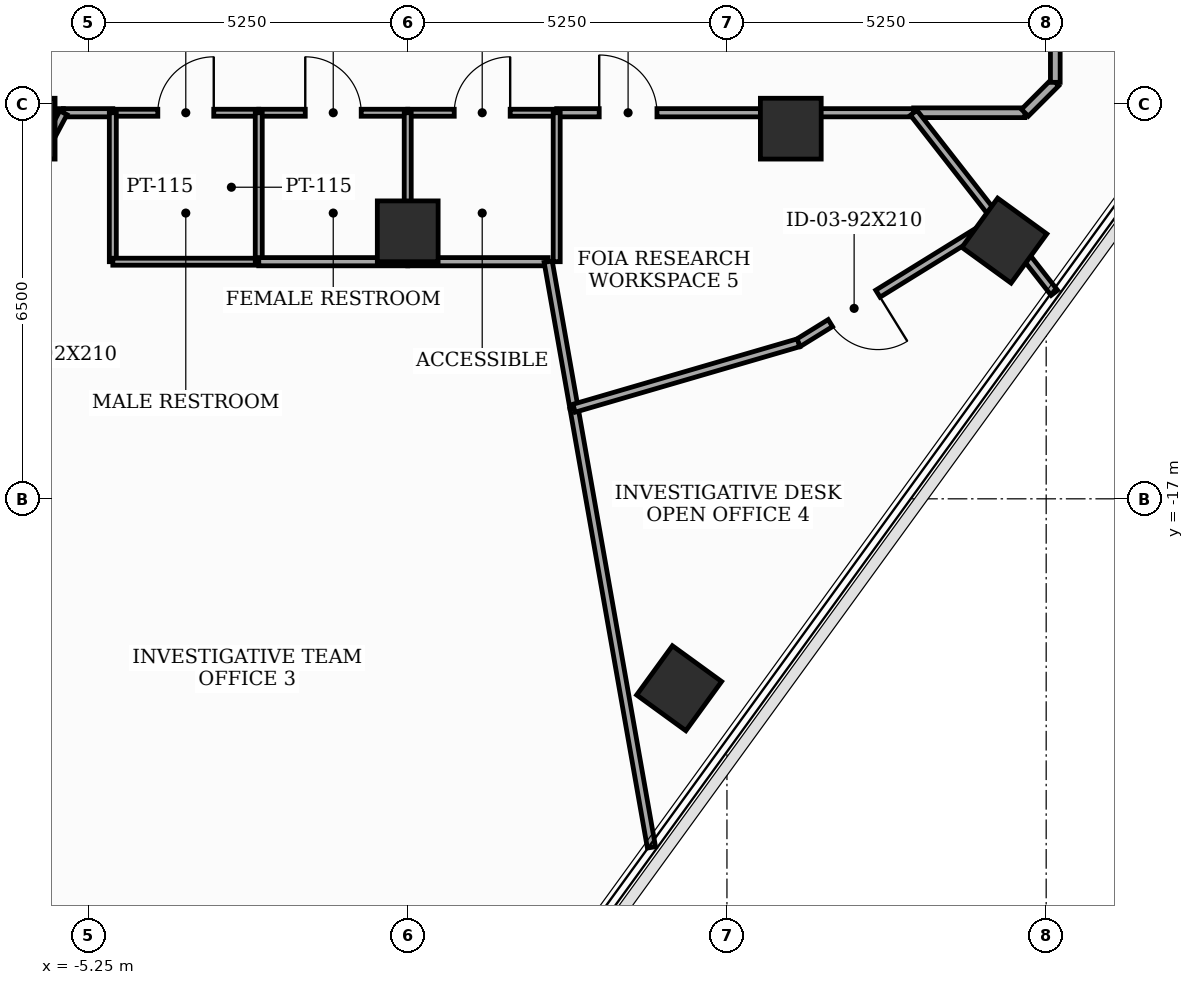
"""IFC4 building model, lengths in metres.
Left out: names, types, materials, properties, quantities, classifications, styles, units other than length and angle.
Written with IfcOpenShell. Run it as: python <this file> out.ifc"""

import sys

from ifc_helpers import new_model, si_unit, direction, frame, frame_2d, origin, origin_2d, place, context, subcontext, project, spatial, rectangle, extrude, element, fill, save


model = new_model("IFC4")
c1 = context("Model", 3, precision=1e-05, world=origin(), true_north=direction((0.0, 1.0)))
c2 = subcontext(c1, "Body", "Model", "MODEL_VIEW")
j1 = project(units=[si_unit("LENGTHUNIT", "METRE"), si_unit("PLANEANGLEUNIT", "RADIAN")], contexts=[c1])
p1 = place(None, origin())
s1 = spatial("IfcSite", under=j1, at=p1, CompositionType="ELEMENT")
p2 = place(p1, origin())
s2 = spatial("IfcBuilding", under=s1, at=p2, CompositionType="ELEMENT")
p3 = place(p2, frame((0.0, 0.0, 237.4)))
s3 = spatial("IfcBuildingStorey", under=s2, at=p3, CompositionType="ELEMENT", Elevation=237.4)
for number, where, z_axis, x_axis in (
    (1, (-6.3, -10.912, 0.0), (0.0, 0.0, 1.0), (1.0, 0.0, 0.0)),
    (2, (0.0, -12.6, 0.0), (0.0, 0.0, 1.0), (1.0, 0.0, 0.0)),
    (3, (6.3, -10.912, 0.0), (0.0, 0.0, 1.0), (1.0, 0.0, 0.0)),
    (4, (4.464, -20.115, 0.0), (0.0, 0.0, 1.0), (0.588, 0.809, 0.0)),
    (5, (9.812, -12.753, 0.0), (0.0, 0.0, 1.0), (0.588, 0.809, 0.0)),
):
    element("IfcColumn", number, at=place(p3, frame(where, z_axis=z_axis, x_axis=x_axis)), inside=s3, PredefinedType="COLUMN", context=c2, shape_type="SweptSolid", body=[
        extrude(rectangle(XDim=1.0, YDim=1.0, at=origin_2d()), origin(), (0.0, 0.0, 1.0), 3.7),
    ])
p4 = place(p3, frame((-10.15, -10.65, 0.0), z_axis=(0.0, 0.0, 1.0), x_axis=(1.0, 0.0, 0.0)))
e6 = element("IfcWall", 6, at=p4, inside=s3, PredefinedType="PARTITIONING", context=c2, shape_type="SweptSolid", body=[
    extrude(rectangle(XDim=4.487, YDim=0.135, at=frame_2d((2.243, 0.0))), origin(), (0.0, 0.0, 1.0), 2.885),
])
p5 = place(p4, frame((0.781, 0.0, 0.0)))
e7 = element("IfcOpeningElement", 7, at=p5, cuts=e6, PredefinedType="OPENING", context=c2, shape_type="SweptSolid", body=[
    extrude(rectangle(XDim=0.95, YDim=2.1, at=frame_2d((0.475, 1.05))), frame((0.0, 0.077, 0.0), z_axis=(0.0, -1.0, 0.0), x_axis=(1.0, 0.0, 0.0)), (0.0, 0.0, 1.0), 0.155),
])
p6 = place(p3, frame((-4.85, -10.65, 0.0), z_axis=(0.0, 0.0, 1.0), x_axis=(1.0, 0.0, 0.0)))
e8 = element("IfcWall", 8, at=p6, inside=s3, PredefinedType="PARTITIONING", context=c2, shape_type="SweptSolid", body=[
    extrude(rectangle(XDim=2.4, YDim=0.115, at=frame_2d((1.2, 0.0))), origin(), (0.0, 0.0, 1.0), 3.5),
])
p7 = place(p6, frame((0.74, 0.0, 0.0)))
e9 = element("IfcOpeningElement", 9, at=p7, cuts=e8, PredefinedType="OPENING", context=c2, shape_type="SweptSolid", body=[
    extrude(rectangle(XDim=0.92, YDim=2.1, at=frame_2d((0.46, 1.05))), frame((0.0, 0.067, 0.0), z_axis=(0.0, -1.0, 0.0), x_axis=(1.0, 0.0, 0.0)), (0.0, 0.0, 1.0), 0.135),
])
p8 = place(p3, frame((-5.663, -10.65, 0.0), z_axis=(0.0, 0.0, 1.0), x_axis=(1.0, 0.0, 0.0)))
e10 = element("IfcWall", 10, at=p8, inside=s3, PredefinedType="PARTITIONING", context=c2, shape_type="SweptSolid", body=[
    extrude(rectangle(XDim=0.813, YDim=0.135, at=frame_2d((0.406, 0.0))), origin(), (0.0, 0.0, 1.0), 3.5),
])
p9 = place(p3, frame((-2.45, -10.65, 0.0), z_axis=(0.0, 0.0, 1.0), x_axis=(1.0, 0.0, 0.0)))
e11 = element("IfcWall", 11, at=p9, inside=s3, PredefinedType="PARTITIONING", context=c2, shape_type="SweptSolid", body=[
    extrude(rectangle(XDim=2.45, YDim=0.115, at=frame_2d((1.225, 0.0))), origin(), (0.0, 0.0, 1.0), 2.885),
])
p10 = place(p9, frame((0.765, 0.0, 0.0)))
e12 = element("IfcOpeningElement", 12, at=p10, cuts=e11, PredefinedType="OPENING", context=c2, shape_type="SweptSolid", body=[
    extrude(rectangle(XDim=0.92, YDim=2.1, at=frame_2d((0.46, 1.05))), frame((0.0, 0.067, 0.0), z_axis=(0.0, -1.0, 0.0), x_axis=(1.0, 0.0, 0.0)), (0.0, 0.0, 1.0), 0.135),
])
p11 = place(p3, frame((0.0, -10.65, 0.0), z_axis=(0.0, 0.0, 1.0), x_axis=(1.0, 0.0, 0.0)))
e13 = element("IfcWall", 13, at=p11, inside=s3, PredefinedType="PARTITIONING", context=c2, shape_type="SweptSolid", body=[
    extrude(rectangle(XDim=2.45, YDim=0.115, at=frame_2d((1.225, 0.0))), origin(), (0.0, 0.0, 1.0), 3.5),
])
p12 = place(p11, frame((0.765, 0.0, 0.0)))
e14 = element("IfcOpeningElement", 14, at=p12, cuts=e13, PredefinedType="OPENING", context=c2, shape_type="SweptSolid", body=[
    extrude(rectangle(XDim=0.92, YDim=2.1, at=frame_2d((0.46, 1.05))), frame((0.0, 0.067, 0.0), z_axis=(0.0, -1.0, 0.0), x_axis=(1.0, 0.0, 0.0)), (0.0, 0.0, 1.0), 0.135),
])
p13 = place(p3, frame((2.45, -10.65, 0.0), z_axis=(0.0, 0.0, 1.0), x_axis=(1.0, 0.0, 0.0)))
e15 = element("IfcWall", 15, at=p13, inside=s3, PredefinedType="PARTITIONING", context=c2, shape_type="SweptSolid", body=[
    extrude(rectangle(XDim=5.871, YDim=0.135, at=frame_2d((2.936, 0.0))), origin(), (0.0, 0.0, 1.0), 2.885),
])
p14 = place(p13, frame((0.699, 0.0, 0.0)))
e16 = element("IfcOpeningElement", 16, at=p14, cuts=e15, PredefinedType="OPENING", context=c2, shape_type="SweptSolid", body=[
    extrude(rectangle(XDim=0.95, YDim=2.1, at=frame_2d((0.475, 1.05))), frame((0.0, 0.077, 0.0), z_axis=(0.0, -1.0, 0.0), x_axis=(1.0, 0.0, 0.0)), (0.0, 0.0, 1.0), 0.155),
])
p15 = place(p3, frame((8.321, -10.65, 0.0), z_axis=(0.0, 0.0, 1.0), x_axis=(1.0, 0.0, 0.0)))
e17 = element("IfcWall", 17, at=p15, inside=s3, PredefinedType="PARTITIONING", context=c2, shape_type="SweptSolid", body=[
    extrude(rectangle(XDim=1.829, YDim=0.16, at=frame_2d((0.915, 0.0))), origin(), (0.0, 0.0, 1.0), 3.5),
])
p16 = place(p3, frame((10.15, -10.65, 0.0), z_axis=(0.0, 0.0, 1.0), x_axis=(0.707106781187, 0.707106781187, 0.0)))
e18 = element("IfcWall", 18, at=p16, inside=s3, PredefinedType="PARTITIONING", context=c2, shape_type="SweptSolid", body=[
    extrude(rectangle(XDim=0.707, YDim=0.16, at=frame_2d((0.354, 0.0))), origin(), (0.0, 0.0, 1.0), 3.5),
])
p17 = place(p3, frame((10.65, -10.15, 0.0), z_axis=(0.0, 0.0, 1.0), x_axis=(0.0, 1.0, 0.0)))
e19 = element("IfcWall", 19, at=p17, inside=s3, PredefinedType="PARTITIONING", context=c2, shape_type="SweptSolid", body=[
    extrude(rectangle(XDim=5.408, YDim=0.16, at=frame_2d((2.704, 0.0))), origin(), (0.0, 0.0, 1.0), 2.885),
])
p18 = place(p17, frame((0.582, 0.0, 0.0)))
e20 = element("IfcOpeningElement", 20, at=p18, cuts=e19, PredefinedType="OPENING", context=c2, shape_type="SweptSolid", body=[
    extrude(rectangle(XDim=1.0, YDim=2.15, at=frame_2d((0.5, 1.075))), frame((0.0, 0.09, 0.0), z_axis=(0.0, -1.0, 0.0), x_axis=(1.0, 0.0, 0.0)), (0.0, 0.0, 1.0), 0.18),
])
p19 = place(p3, frame((-9.893, -18.605, 0.0), z_axis=(0.0, 0.0, 1.0), x_axis=(0.469478145305, 0.88294409284, 0.0)))
e21 = element("IfcWall", 21, at=p19, inside=s3, PredefinedType="PARTITIONING", context=c2, shape_type="SweptSolid", body=[
    extrude(rectangle(XDim=9.01, YDim=0.135, at=frame_2d((4.505, 0.0))), origin(), (0.0, 0.0, 1.0), 2.885),
])
p20 = place(p19, frame((4.045, 0.0, 0.0)))
e22 = element("IfcOpeningElement", 22, at=p20, cuts=e21, PredefinedType="OPENING", context=c2, shape_type="SweptSolid", body=[
    extrude(rectangle(XDim=0.92, YDim=2.1, at=frame_2d((0.46, 1.05))), frame((0.0, 0.077, 0.0), z_axis=(0.0, -1.0, 0.0), x_axis=(1.0, 0.0, 0.0)), (0.0, 0.0, 1.0), 0.155),
])
p21 = place(p3, frame((-4.85, -10.65, 0.0), z_axis=(0.0, 0.0, 1.0), x_axis=(0.0, -1.0, 0.0)))
e23 = element("IfcWall", 23, at=p21, inside=s3, PredefinedType="PARTITIONING", context=c2, shape_type="SweptSolid", body=[
    extrude(rectangle(XDim=2.45, YDim=0.115, at=frame_2d((1.225, 0.0))), origin(), (0.0, 0.0, 1.0), 2.885),
])
p22 = place(p3, frame((-4.85, -13.1, 0.0), z_axis=(0.0, 0.0, 1.0), x_axis=(1.0, 0.0, 0.0)))
e24 = element("IfcWall", 24, at=p22, inside=s3, PredefinedType="PARTITIONING", context=c2, shape_type="SweptSolid", body=[
    extrude(rectangle(XDim=2.4, YDim=0.115, at=frame_2d((1.2, 0.0))), origin(), (0.0, 0.0, 1.0), 3.5),
])
p23 = place(p3, frame((-2.45, -13.1, 0.0), z_axis=(0.0, 0.0, 1.0), x_axis=(0.0, 1.0, 0.0)))
e25 = element("IfcWall", 25, at=p23, inside=s3, PredefinedType="PARTITIONING", context=c2, shape_type="SweptSolid", body=[
    extrude(rectangle(XDim=2.45, YDim=0.115, at=frame_2d((1.225, 0.0))), origin(), (0.0, 0.0, 1.0), 2.885),
])
p24 = place(p3, frame((0.0, -13.1, 0.0), z_axis=(0.0, 0.0, 1.0), x_axis=(-1.0, 0.0, 0.0)))
e26 = element("IfcWall", 26, at=p24, inside=s3, PredefinedType="PARTITIONING", context=c2, shape_type="SweptSolid", body=[
    extrude(rectangle(XDim=2.45, YDim=0.135, at=frame_2d((1.225, 0.0))), origin(), (0.0, 0.0, 1.0), 3.5),
])
p25 = place(p3, frame((2.31, -13.1, 0.0), z_axis=(0.0, 0.0, 1.0), x_axis=(-1.0, 0.0, 0.0)))
e27 = element("IfcWall", 27, at=p25, inside=s3, PredefinedType="PARTITIONING", context=c2, shape_type="SweptSolid", body=[
    extrude(rectangle(XDim=2.31, YDim=0.135, at=frame_2d((1.155, 0.0))), origin(), (0.0, 0.0, 1.0), 2.985),
])
p26 = place(p3, frame((4.009, -22.732, 0.0), z_axis=(0.0, 0.0, 1.0), x_axis=(-0.173639103053, 0.984809353068, 0.0)))
e28 = element("IfcWall", 28, at=p26, inside=s3, PredefinedType="PARTITIONING", context=c2, shape_type="SweptSolid", body=[
    extrude(rectangle(XDim=7.334, YDim=0.135, at=frame_2d((3.667, 0.0))), origin(), (0.0, 0.0, 1.0), 2.985),
])
p27 = place(p3, frame((2.735, -15.51, 0.0), z_axis=(0.0, 0.0, 1.0), x_axis=(-0.173694270709, 0.984799624453, 0.0)))
e29 = element("IfcWall", 29, at=p27, inside=s3, PredefinedType="PARTITIONING", context=c2, shape_type="SweptSolid", body=[
    extrude(rectangle(XDim=2.447, YDim=0.135, at=frame_2d((1.224, 0.0))), origin(), (0.0, 0.0, 1.0), 3.5),
])
for number, where, z_axis, x_axis in (
    (30, (0.0, -13.1, 0.0), (0.0, 0.0, 1.0), (0.0, 1.0, 0.0)),
    (31, (2.45, -13.1, 0.0), (0.0, 0.0, 1.0), (0.0, 1.0, 0.0)),
):
    element("IfcWall", number, at=place(p3, frame(where, z_axis=z_axis, x_axis=x_axis)), inside=s3, PredefinedType="PARTITIONING", context=c2, shape_type="SweptSolid", body=[
        extrude(rectangle(XDim=2.45, YDim=0.115, at=frame_2d((1.225, 0.0))), origin(), (0.0, 0.0, 1.0), 2.885),
    ])
p28 = place(p3, frame((9.696, -12.411, 0.0), z_axis=(0.0, 0.0, 1.0), x_axis=(-0.850393663863, -0.526146953295, 0.0)))
e32 = element("IfcWall", 32, at=p28, inside=s3, PredefinedType="PARTITIONING", context=c2, shape_type="SweptSolid", body=[
    extrude(rectangle(XDim=3.845, YDim=0.135, at=frame_2d((1.923, 0.0))), origin(), (0.0, 0.0, 1.0), 2.985),
])
p29 = place(p28, frame((2.309, 0.0, 0.0)))
e33 = element("IfcOpeningElement", 33, at=p29, cuts=e32, PredefinedType="OPENING", context=c2, shape_type="SweptSolid", body=[
    extrude(rectangle(XDim=0.92, YDim=2.1, at=frame_2d((0.46, 1.05))), frame((0.0, 0.077, 0.0), z_axis=(0.0, -1.0, 0.0), x_axis=(1.0, 0.0, 0.0)), (0.0, 0.0, 1.0), 0.155),
])
p30 = place(p3, frame((6.426, -14.434, 0.0), z_axis=(0.0, 0.0, 1.0), x_axis=(-0.960041241254, -0.279858562654, 0.0)))
e34 = element("IfcWall", 34, at=p30, inside=s3, PredefinedType="PARTITIONING", context=c2, shape_type="SweptSolid", body=[
    extrude(rectangle(XDim=3.844, YDim=0.135, at=frame_2d((1.922, 0.0))), origin(), (0.0, 0.0, 1.0), 3.5),
])
p31 = place(p3, frame((10.635, -13.612, 0.0), z_axis=(0.0, 0.0, 1.0), x_axis=(-0.615768345532, 0.787927245779, 0.0)))
e35 = element("IfcWall", 35, at=p31, inside=s3, PredefinedType="PARTITIONING", context=c2, shape_type="SweptSolid", body=[
    extrude(rectangle(XDim=1.524, YDim=0.135, at=frame_2d((0.762, 0.0))), origin(), (0.0, 0.0, 1.0), 2.985),
])
p32 = place(p3, frame((9.696, -12.411, 0.0), z_axis=(0.0, 0.0, 1.0), x_axis=(-0.615429845305, 0.788191668002, 0.0)))
e36 = element("IfcWall", 36, at=p32, inside=s3, PredefinedType="PARTITIONING", context=c2, shape_type="SweptSolid", body=[
    extrude(rectangle(XDim=2.234, YDim=0.135, at=frame_2d((1.117, 0.0))), origin(), (0.0, 0.0, 1.0), 2.985),
])
p33 = place(p7, origin())
e37 = element("IfcDoor", 37, at=p33, inside=s3, OperationType="SINGLE_SWING_RIGHT", PredefinedType="DOOR", context=c2, shape_type="SweptSolid", body=[
    extrude(rectangle(XDim=0.92, YDim=2.1, at=frame_2d((0.46, 1.05))), frame((0.0, 0.025, 0.0), z_axis=(0.0, -1.0, 0.0), x_axis=(1.0, 0.0, 0.0)), (0.0, 0.0, 1.0), 0.05),
])
fill(e9, e37)
p34 = place(p10, origin())
e38 = element("IfcDoor", 38, at=p34, inside=s3, OperationType="SINGLE_SWING_LEFT", PredefinedType="DOOR", context=c2, shape_type="SweptSolid", body=[
    extrude(rectangle(XDim=0.92, YDim=2.1, at=frame_2d((0.46, 1.05))), frame((0.0, 0.025, 0.0), z_axis=(0.0, -1.0, 0.0), x_axis=(1.0, 0.0, 0.0)), (0.0, 0.0, 1.0), 0.05),
])
fill(e12, e38)
p35 = place(p12, origin())
e39 = element("IfcDoor", 39, at=p35, inside=s3, OperationType="SINGLE_SWING_RIGHT", PredefinedType="DOOR", context=c2, shape_type="SweptSolid", body=[
    extrude(rectangle(XDim=0.92, YDim=2.1, at=frame_2d((0.46, 1.05))), frame((0.0, 0.025, 0.0), z_axis=(0.0, -1.0, 0.0), x_axis=(1.0, 0.0, 0.0)), (0.0, 0.0, 1.0), 0.05),
])
fill(e14, e39)
p36 = place(p14, origin())
e40 = element("IfcDoor", 40, at=p36, inside=s3, OperationType="SINGLE_SWING_LEFT", PredefinedType="DOOR", context=c2, shape_type="SweptSolid", body=[
    extrude(rectangle(XDim=0.95, YDim=2.1, at=frame_2d((0.475, 1.05))), frame((0.0, 0.025, 0.0), z_axis=(0.0, -1.0, 0.0), x_axis=(1.0, 0.0, 0.0)), (0.0, 0.0, 1.0), 0.05),
])
fill(e16, e40)
p37 = place(p29, origin())
e41 = element("IfcDoor", 41, at=p37, inside=s3, OperationType="SINGLE_SWING_LEFT", PredefinedType="DOOR", context=c2, shape_type="SweptSolid", body=[
    extrude(rectangle(XDim=0.92, YDim=2.1, at=frame_2d((0.46, 1.05))), frame((0.0, 0.025, 0.0), z_axis=(0.0, -1.0, 0.0), x_axis=(1.0, 0.0, 0.0)), (0.0, 0.0, 1.0), 0.05),
])
fill(e33, e41)
save(model, sys.argv[1])
